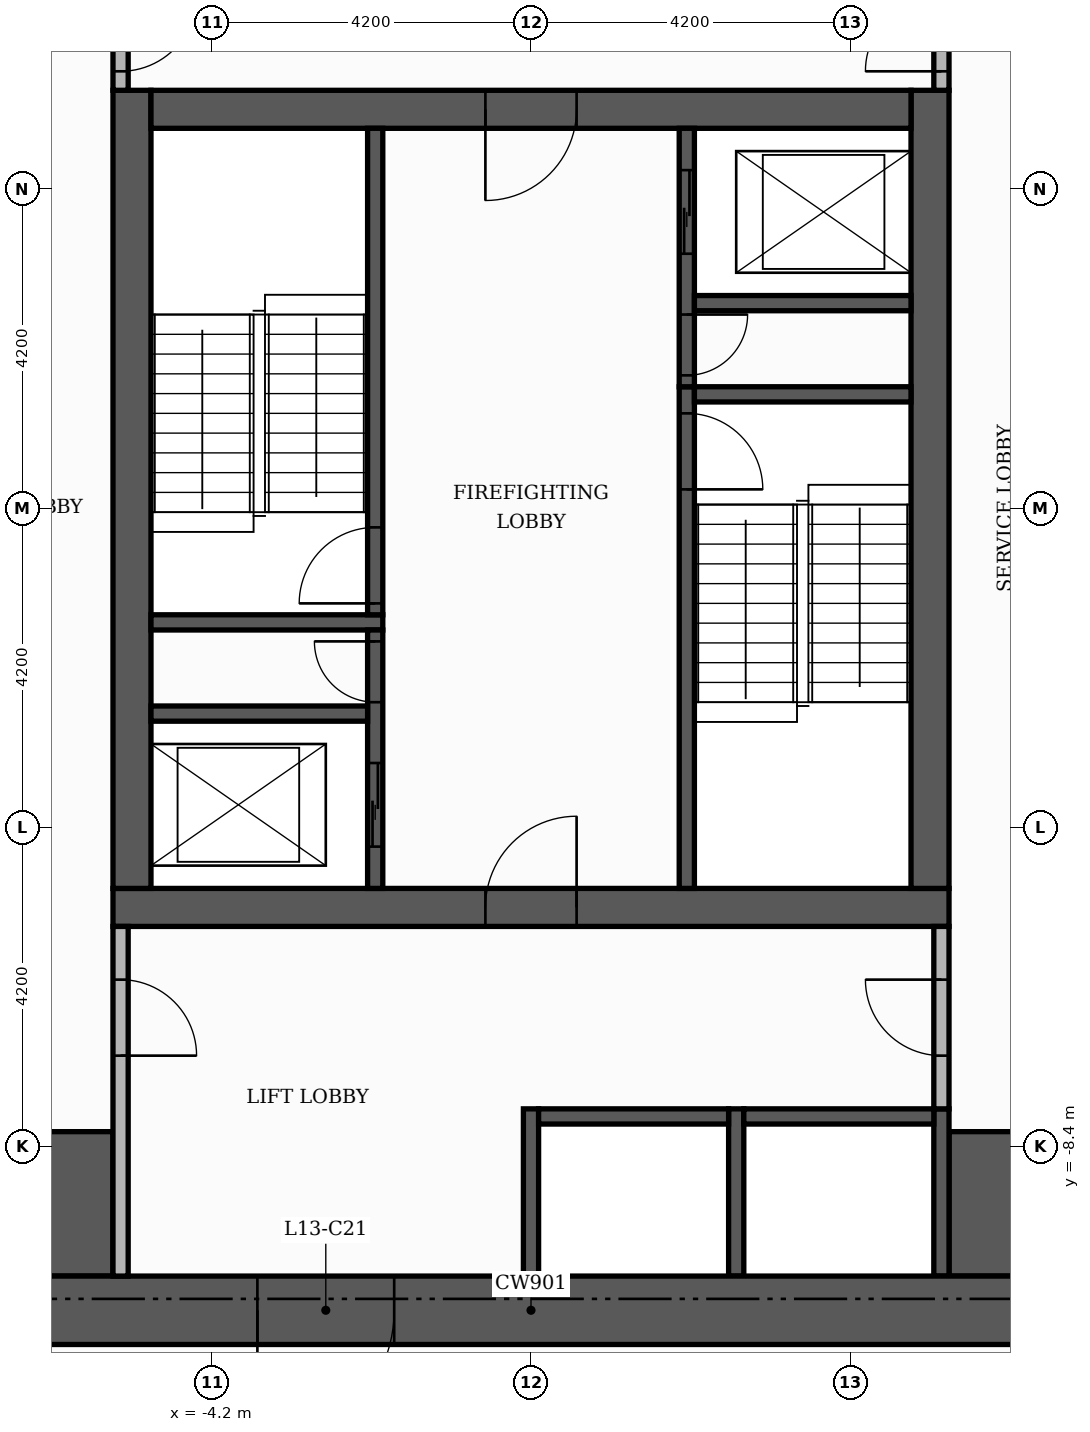
"""IFC4 building model, lengths in metres.
Left out: names, types, materials, properties, quantities, classifications, styles, units other than length and angle.
Written with IfcOpenShell. Run it as: python <this file> out.ifc"""

import sys

from ifc_helpers import new_model, si_unit, direction, frame, frame_2d, origin, place, context, subcontext, project, spatial, rectangle, extrude, element, fill, save


model = new_model("IFC4")
c1 = context("Model", 3, precision=1e-05, world=origin(), true_north=direction((0.0, 1.0)))
c2 = subcontext(c1, "Body", "Model", "MODEL_VIEW")
j1 = project(units=[si_unit("LENGTHUNIT", "METRE"), si_unit("PLANEANGLEUNIT", "RADIAN")], contexts=[c1])
p1 = place(None, origin())
s1 = spatial("IfcSite", under=j1, at=p1, CompositionType="ELEMENT")
p2 = place(p1, origin())
s2 = spatial("IfcBuilding", under=s1, at=p2, CompositionType="ELEMENT")
p3 = place(p2, frame((0.0, 0.0, 58.2)))
s3 = spatial("IfcBuildingStorey", under=s2, at=p3, CompositionType="ELEMENT", Elevation=58.2)
p4 = place(p3, frame((-5.5, -5.25, 0.0), z_axis=(0.0, 0.0, 1.0), x_axis=(1.0, 0.0, 0.0)))
e1 = element("IfcWall", 1, at=p4, inside=s3, PredefinedType="SHEAR", context=c2, shape_type="SweptSolid", body=[
    extrude(rectangle(XDim=11.0, YDim=0.5, at=frame_2d((5.5, 0.0))), origin(), (0.0, 0.0, 1.0), 3.48),
])
p5 = place(p4, frame((4.9, 0.0, 0.0)))
e2 = element("IfcOpeningElement", 2, at=p5, cuts=e1, PredefinedType="OPENING", context=c2, shape_type="SweptSolid", body=[
    extrude(rectangle(XDim=1.2, YDim=2.1, at=frame_2d((0.6, 1.05))), frame((0.0, 0.26, 0.0), z_axis=(0.0, -1.0, 0.0), x_axis=(1.0, 0.0, 0.0)), (0.0, 0.0, 1.0), 0.52),
])
for number, where, z_axis, x_axis in (
    (3, (-5.25, -5.0, 0.0), (0.0, 0.0, 1.0), (0.0, 1.0, 0.0)),
    (4, (5.25, -5.0, 0.0), (0.0, 0.0, 1.0), (0.0, 1.0, 0.0)),
):
    element("IfcWall", number, at=place(p3, frame(where, z_axis=z_axis, x_axis=x_axis)), inside=s3, PredefinedType="SHEAR", context=c2, shape_type="SweptSolid", body=[
        extrude(rectangle(XDim=10.5, YDim=0.5, at=frame_2d((5.25, 0.0))), origin(), (0.0, 0.0, 1.0), 3.48),
    ])
p6 = place(p3, frame((-5.0, 5.25, 0.0), z_axis=(0.0, 0.0, 1.0), x_axis=(1.0, 0.0, 0.0)))
e5 = element("IfcWall", 5, at=p6, inside=s3, PredefinedType="SHEAR", context=c2, shape_type="SweptSolid", body=[
    extrude(rectangle(XDim=10.0, YDim=0.5, at=frame_2d((5.0, 0.0))), origin(), (0.0, 0.0, 1.0), 3.48),
])
p7 = place(p6, frame((4.4, 0.0, 0.0)))
e6 = element("IfcOpeningElement", 6, at=p7, cuts=e5, PredefinedType="OPENING", context=c2, shape_type="SweptSolid", body=[
    extrude(rectangle(XDim=1.2, YDim=2.1, at=frame_2d((0.6, 1.05))), frame((0.0, 0.26, 0.0), z_axis=(0.0, -1.0, 0.0), x_axis=(1.0, 0.0, 0.0)), (0.0, 0.0, 1.0), 0.52),
])
for number, where, z_axis, x_axis in (
    (7, (-10.1, -9.15, 0.0), (0.0, 0.0, 1.0), (1.0, 0.0, 0.0)),
    (8, (5.5, -9.15, 0.0), (0.0, 0.0, 1.0), (1.0, 0.0, 0.0)),
):
    element("IfcWall", number, at=place(p3, frame(where, z_axis=z_axis, x_axis=x_axis)), inside=s3, PredefinedType="SHEAR", context=c2, shape_type="SweptSolid", body=[
        extrude(rectangle(XDim=4.6, YDim=1.9, at=frame_2d((2.3, 0.0))), origin(), (0.0, 0.0, 1.0), 3.48),
    ])
p8 = place(p3, frame((2.05, -5.0, 0.0), z_axis=(0.0, 0.0, 1.0), x_axis=(0.0, 1.0, 0.0)))
e9 = element("IfcWall", 9, at=p8, inside=s3, PredefinedType="SHEAR", context=c2, shape_type="SweptSolid", body=[
    extrude(rectangle(XDim=6.6, YDim=0.2, at=frame_2d((3.3, 0.0))), origin(), (0.0, 0.0, 1.0), 3.48),
])
p9 = place(p8, frame((5.25, 0.0, 0.0)))
e10 = element("IfcOpeningElement", 10, at=p9, cuts=e9, PredefinedType="OPENING", context=c2, shape_type="SweptSolid", body=[
    extrude(rectangle(XDim=1.0, YDim=2.1, at=frame_2d((0.5, 1.05))), frame((0.0, 0.11, 0.0), z_axis=(0.0, -1.0, 0.0), x_axis=(1.0, 0.0, 0.0)), (0.0, 0.0, 1.0), 0.22),
])
p10 = place(p3, frame((-5.0, -1.5, 0.0), z_axis=(0.0, 0.0, 1.0), x_axis=(1.0, 0.0, 0.0)))
e11 = element("IfcWall", 11, at=p10, inside=s3, PredefinedType="SHEAR", context=c2, shape_type="SweptSolid", body=[
    extrude(rectangle(XDim=3.05, YDim=0.2, at=frame_2d((1.525, 0.0))), origin(), (0.0, 0.0, 1.0), 3.48),
])
p11 = place(p3, frame((-2.05, -1.4, 0.0), z_axis=(0.0, 0.0, 1.0), x_axis=(0.0, 1.0, 0.0)))
e12 = element("IfcWall", 12, at=p11, inside=s3, PredefinedType="SHEAR", context=c2, shape_type="SweptSolid", body=[
    extrude(rectangle(XDim=6.4, YDim=0.2, at=frame_2d((3.2, 0.0))), origin(), (0.0, 0.0, 1.0), 3.48),
])
p12 = place(p11, frame((0.15, 0.0, 0.0)))
e13 = element("IfcOpeningElement", 13, at=p12, cuts=e12, PredefinedType="OPENING", context=c2, shape_type="SweptSolid", body=[
    extrude(rectangle(XDim=1.0, YDim=2.1, at=frame_2d((0.5, 1.05))), frame((0.0, 0.11, 0.0), z_axis=(0.0, -1.0, 0.0), x_axis=(1.0, 0.0, 0.0)), (0.0, 0.0, 1.0), 0.22),
])
p13 = place(p3, frame((2.15, 1.5, 0.0), z_axis=(0.0, 0.0, 1.0), x_axis=(1.0, 0.0, 0.0)))
e14 = element("IfcWall", 14, at=p13, inside=s3, PredefinedType="SHEAR", context=c2, shape_type="SweptSolid", body=[
    extrude(rectangle(XDim=2.85, YDim=0.2, at=frame_2d((1.425, 0.0))), origin(), (0.0, 0.0, 1.0), 3.48),
])
for number, where, z_axis, x_axis in (
    (15, (0.0, -10.1, 0.0), (0.0, 0.0, 1.0), (0.0, 1.0, 0.0)),
    (16, (2.7, -10.1, 0.0), (0.0, 0.0, 1.0), (0.0, 1.0, 0.0)),
    (17, (5.4, -10.1, 0.0), (0.0, 0.0, 1.0), (0.0, 1.0, 0.0)),
):
    element("IfcWall", number, at=place(p3, frame(where, z_axis=z_axis, x_axis=x_axis)), inside=s3, PredefinedType="SHEAR", context=c2, shape_type="SweptSolid", body=[
        extrude(rectangle(XDim=2.2, YDim=0.2, at=frame_2d((1.1, 0.0))), origin(), (0.0, 0.0, 1.0), 3.48),
    ])
for number, where, z_axis, x_axis in (
    (18, (0.1, -8.0, 0.0), (0.0, 0.0, 1.0), (1.0, 0.0, 0.0)),
    (19, (2.8, -8.0, 0.0), (0.0, 0.0, 1.0), (1.0, 0.0, 0.0)),
):
    element("IfcWall", number, at=place(p3, frame(where, z_axis=z_axis, x_axis=x_axis)), inside=s3, PredefinedType="SHEAR", context=c2, shape_type="SweptSolid", body=[
        extrude(rectangle(XDim=2.5, YDim=0.2, at=frame_2d((1.25, 0.0))), origin(), (0.0, 0.0, 1.0), 3.48),
    ])
p14 = place(p3, frame((-2.05, -5.0, 0.0), z_axis=(0.0, 0.0, 1.0), x_axis=(0.0, 1.0, 0.0)))
e20 = element("IfcWall", 20, at=p14, inside=s3, PredefinedType="SHEAR", context=c2, shape_type="SweptSolid", body=[
    extrude(rectangle(XDim=3.4, YDim=0.2, at=frame_2d((1.7, 0.0))), origin(), (0.0, 0.0, 1.0), 3.48),
])
p15 = place(p14, frame((0.55, 0.0, 0.0)))
e21 = element("IfcOpeningElement", 21, at=p15, cuts=e20, PredefinedType="OPENING", context=c2, shape_type="SweptSolid", body=[
    extrude(rectangle(XDim=1.1, YDim=2.1, at=frame_2d((0.55, 1.05))), frame((0.0, 0.11, 0.0), z_axis=(0.0, -1.0, 0.0), x_axis=(1.0, 0.0, 0.0)), (0.0, 0.0, 1.0), 0.22),
])
p16 = place(p14, frame((2.45, 0.0, 0.0)))
e22 = element("IfcOpeningElement", 22, at=p16, cuts=e20, PredefinedType="OPENING", context=c2, shape_type="SweptSolid", body=[
    extrude(rectangle(XDim=0.8, YDim=2.1, at=frame_2d((0.4, 1.05))), frame((0.0, 0.11, 0.0), z_axis=(0.0, -1.0, 0.0), x_axis=(1.0, 0.0, 0.0)), (0.0, 0.0, 1.0), 0.22),
])
p17 = place(p3, frame((-5.0, -2.7, 0.0), z_axis=(0.0, 0.0, 1.0), x_axis=(1.0, 0.0, 0.0)))
e23 = element("IfcWall", 23, at=p17, inside=s3, PredefinedType="SHEAR", context=c2, shape_type="SweptSolid", body=[
    extrude(rectangle(XDim=2.85, YDim=0.2, at=frame_2d((1.425, 0.0))), origin(), (0.0, 0.0, 1.0), 3.48),
])
p18 = place(p3, frame((2.05, 1.6, 0.0), z_axis=(0.0, 0.0, 1.0), x_axis=(0.0, 1.0, 0.0)))
e24 = element("IfcWall", 24, at=p18, inside=s3, PredefinedType="SHEAR", context=c2, shape_type="SweptSolid", body=[
    extrude(rectangle(XDim=3.4, YDim=0.2, at=frame_2d((1.7, 0.0))), origin(), (0.0, 0.0, 1.0), 3.48),
])
p19 = place(p18, frame((1.75, 0.0, 0.0)))
e25 = element("IfcOpeningElement", 25, at=p19, cuts=e24, PredefinedType="OPENING", context=c2, shape_type="SweptSolid", body=[
    extrude(rectangle(XDim=1.1, YDim=2.1, at=frame_2d((0.55, 1.05))), frame((0.0, 0.11, 0.0), z_axis=(0.0, -1.0, 0.0), x_axis=(1.0, 0.0, 0.0)), (0.0, 0.0, 1.0), 0.22),
])
p20 = place(p18, frame((0.15, 0.0, 0.0)))
e26 = element("IfcOpeningElement", 26, at=p20, cuts=e24, PredefinedType="OPENING", context=c2, shape_type="SweptSolid", body=[
    extrude(rectangle(XDim=0.8, YDim=2.1, at=frame_2d((0.4, 1.05))), frame((0.0, 0.11, 0.0), z_axis=(0.0, -1.0, 0.0), x_axis=(1.0, 0.0, 0.0)), (0.0, 0.0, 1.0), 0.22),
])
p21 = place(p3, frame((2.15, 2.7, 0.0), z_axis=(0.0, 0.0, 1.0), x_axis=(1.0, 0.0, 0.0)))
e27 = element("IfcWall", 27, at=p21, inside=s3, PredefinedType="SHEAR", context=c2, shape_type="SweptSolid", body=[
    extrude(rectangle(XDim=2.85, YDim=0.2, at=frame_2d((1.425, 0.0))), origin(), (0.0, 0.0, 1.0), 3.48),
])
p22 = place(p3, frame((-11.0, -10.55, 0.0), z_axis=(0.0, 0.0, 1.0), x_axis=(1.0, 0.0, 0.0)))
e28 = element("IfcWall", 28, at=p22, inside=s3, PredefinedType="SHEAR", context=c2, shape_type="SweptSolid", body=[
    extrude(rectangle(XDim=22.0, YDim=0.9, at=frame_2d((11.0, 0.0))), origin(), (0.0, 0.0, 1.0), 3.48),
])
p23 = place(p22, frame((7.4, 0.0, 0.0)))
e29 = element("IfcOpeningElement", 29, at=p23, cuts=e28, PredefinedType="OPENING", context=c2, shape_type="SweptSolid", body=[
    extrude(rectangle(XDim=1.8, YDim=2.2, at=frame_2d((0.9, 1.1))), frame((0.0, 0.46, 0.0), z_axis=(0.0, -1.0, 0.0), x_axis=(1.0, 0.0, 0.0)), (0.0, 0.0, 1.0), 0.92),
])
p24 = place(p3, frame((-5.4, -10.1, 0.0), z_axis=(0.0, 0.0, 1.0), x_axis=(0.0, 1.0, 0.0)))
e30 = element("IfcWall", 30, at=p24, inside=s3, PredefinedType="PARTITIONING", context=c2, shape_type="SweptSolid", body=[
    extrude(rectangle(XDim=4.6, YDim=0.2, at=frame_2d((2.3, 0.0))), origin(), (0.0, 0.0, 1.0), 3.48),
])
p25 = place(p24, frame((2.9, 0.0, 0.0)))
e31 = element("IfcOpeningElement", 31, at=p25, cuts=e30, PredefinedType="OPENING", context=c2, shape_type="SweptSolid", body=[
    extrude(rectangle(XDim=1.0, YDim=2.1, at=frame_2d((0.5, 1.05))), frame((0.0, 0.11, 0.0), z_axis=(0.0, -1.0, 0.0), x_axis=(1.0, 0.0, 0.0)), (0.0, 0.0, 1.0), 0.22),
])
p26 = place(p3, frame((5.4, -7.9, 0.0), z_axis=(0.0, 0.0, 1.0), x_axis=(0.0, 1.0, 0.0)))
e32 = element("IfcWall", 32, at=p26, inside=s3, PredefinedType="PARTITIONING", context=c2, shape_type="SweptSolid", body=[
    extrude(rectangle(XDim=2.4, YDim=0.2, at=frame_2d((1.2, 0.0))), origin(), (0.0, 0.0, 1.0), 3.48),
])
p27 = place(p26, frame((0.7, 0.0, 0.0)))
e33 = element("IfcOpeningElement", 33, at=p27, cuts=e32, PredefinedType="OPENING", context=c2, shape_type="SweptSolid", body=[
    extrude(rectangle(XDim=1.0, YDim=2.1, at=frame_2d((0.5, 1.05))), frame((0.0, 0.11, 0.0), z_axis=(0.0, -1.0, 0.0), x_axis=(1.0, 0.0, 0.0)), (0.0, 0.0, 1.0), 0.22),
])
p28 = place(p3, frame((-5.4, 5.5, 0.0), z_axis=(0.0, 0.0, 1.0), x_axis=(0.0, 1.0, 0.0)))
e34 = element("IfcWall", 34, at=p28, inside=s3, PredefinedType="PARTITIONING", context=c2, shape_type="SweptSolid", body=[
    extrude(rectangle(XDim=1.55, YDim=0.2, at=frame_2d((0.775, 0.0))), origin(), (0.0, 0.0, 1.0), 3.48),
])
p29 = place(p28, frame((0.25, 0.0, 0.0)))
e35 = element("IfcOpeningElement", 35, at=p29, cuts=e34, PredefinedType="OPENING", context=c2, shape_type="SweptSolid", body=[
    extrude(rectangle(XDim=1.0, YDim=2.1, at=frame_2d((0.5, 1.05))), frame((0.0, 0.11, 0.0), z_axis=(0.0, -1.0, 0.0), x_axis=(1.0, 0.0, 0.0)), (0.0, 0.0, 1.0), 0.22),
])
p30 = place(p3, frame((5.4, 5.5, 0.0), z_axis=(0.0, 0.0, 1.0), x_axis=(0.0, 1.0, 0.0)))
e36 = element("IfcWall", 36, at=p30, inside=s3, PredefinedType="PARTITIONING", context=c2, shape_type="SweptSolid", body=[
    extrude(rectangle(XDim=4.6, YDim=0.2, at=frame_2d((2.3, 0.0))), origin(), (0.0, 0.0, 1.0), 3.48),
])
p31 = place(p30, frame((0.25, 0.0, 0.0)))
e37 = element("IfcOpeningElement", 37, at=p31, cuts=e36, PredefinedType="OPENING", context=c2, shape_type="SweptSolid", body=[
    extrude(rectangle(XDim=1.0, YDim=2.1, at=frame_2d((0.5, 1.05))), frame((0.0, 0.11, 0.0), z_axis=(0.0, -1.0, 0.0), x_axis=(1.0, 0.0, 0.0)), (0.0, 0.0, 1.0), 0.22),
])
p32 = place(p19, origin())
e38 = element("IfcDoor", 38, at=p32, inside=s3, OperationType="SLIDING_TO_LEFT", PredefinedType="DOOR", context=c2, shape_type="SweptSolid", body=[
    extrude(rectangle(XDim=1.1, YDim=2.1, at=frame_2d((0.55, 1.05))), frame((0.0, 0.025, 0.0), z_axis=(0.0, -1.0, 0.0), x_axis=(1.0, 0.0, 0.0)), (0.0, 0.0, 1.0), 0.05),
])
fill(e25, e38)
p33 = place(p15, origin())
e39 = element("IfcDoor", 39, at=p33, inside=s3, OperationType="SLIDING_TO_LEFT", PredefinedType="DOOR", context=c2, shape_type="SweptSolid", body=[
    extrude(rectangle(XDim=1.1, YDim=2.1, at=frame_2d((0.55, 1.05))), frame((0.0, 0.025, 0.0), z_axis=(0.0, -1.0, 0.0), x_axis=(1.0, 0.0, 0.0)), (0.0, 0.0, 1.0), 0.05),
])
fill(e21, e39)
p34 = place(p12, origin())
e40 = element("IfcDoor", 40, at=p34, inside=s3, OperationType="SINGLE_SWING_LEFT", PredefinedType="DOOR", context=c2, shape_type="SweptSolid", body=[
    extrude(rectangle(XDim=1.0, YDim=2.1, at=frame_2d((0.5, 1.05))), frame((0.0, 0.025, 0.0), z_axis=(0.0, -1.0, 0.0), x_axis=(1.0, 0.0, 0.0)), (0.0, 0.0, 1.0), 0.05),
])
fill(e13, e40)
p35 = place(p9, frame((1.0, 0.0, 0.0), z_axis=(0.0, 0.0, 1.0), x_axis=(-1.0, 0.0, 0.0)))
e41 = element("IfcDoor", 41, at=p35, inside=s3, OperationType="SINGLE_SWING_LEFT", PredefinedType="DOOR", context=c2, shape_type="SweptSolid", body=[
    extrude(rectangle(XDim=1.0, YDim=2.1, at=frame_2d((0.5, 1.05))), frame((0.0, 0.025, 0.0), z_axis=(0.0, -1.0, 0.0), x_axis=(1.0, 0.0, 0.0)), (0.0, 0.0, 1.0), 0.05),
])
fill(e10, e41)
p36 = place(p20, frame((0.8, 0.0, 0.0), z_axis=(0.0, 0.0, 1.0), x_axis=(-1.0, 0.0, 0.0)))
e42 = element("IfcDoor", 42, at=p36, inside=s3, OperationType="SINGLE_SWING_RIGHT", PredefinedType="DOOR", context=c2, shape_type="SweptSolid", body=[
    extrude(rectangle(XDim=0.8, YDim=2.1, at=frame_2d((0.4, 1.05))), frame((0.0, 0.025, 0.0), z_axis=(0.0, -1.0, 0.0), x_axis=(1.0, 0.0, 0.0)), (0.0, 0.0, 1.0), 0.05),
])
fill(e26, e42)
p37 = place(p16, origin())
e43 = element("IfcDoor", 43, at=p37, inside=s3, OperationType="SINGLE_SWING_RIGHT", PredefinedType="DOOR", context=c2, shape_type="SweptSolid", body=[
    extrude(rectangle(XDim=0.8, YDim=2.1, at=frame_2d((0.4, 1.05))), frame((0.0, 0.025, 0.0), z_axis=(0.0, -1.0, 0.0), x_axis=(1.0, 0.0, 0.0)), (0.0, 0.0, 1.0), 0.05),
])
fill(e22, e43)
p38 = place(p7, frame((1.2, 0.0, 0.0), z_axis=(0.0, 0.0, 1.0), x_axis=(-1.0, 0.0, 0.0)))
e44 = element("IfcDoor", 44, at=p38, inside=s3, OperationType="SINGLE_SWING_LEFT", PredefinedType="DOOR", context=c2, shape_type="SweptSolid", body=[
    extrude(rectangle(XDim=1.2, YDim=2.1, at=frame_2d((0.6, 1.05))), frame((0.0, 0.025, 0.0), z_axis=(0.0, -1.0, 0.0), x_axis=(1.0, 0.0, 0.0)), (0.0, 0.0, 1.0), 0.05),
])
fill(e6, e44)
p39 = place(p5, origin())
e45 = element("IfcDoor", 45, at=p39, inside=s3, OperationType="SINGLE_SWING_RIGHT", PredefinedType="DOOR", context=c2, shape_type="SweptSolid", body=[
    extrude(rectangle(XDim=1.2, YDim=2.1, at=frame_2d((0.6, 1.05))), frame((0.0, 0.025, 0.0), z_axis=(0.0, -1.0, 0.0), x_axis=(1.0, 0.0, 0.0)), (0.0, 0.0, 1.0), 0.05),
])
fill(e2, e45)
p40 = place(p29, frame((1.0, 0.0, 0.0), z_axis=(0.0, 0.0, 1.0), x_axis=(-1.0, 0.0, 0.0)))
e46 = element("IfcDoor", 46, at=p40, inside=s3, OperationType="SINGLE_SWING_RIGHT", PredefinedType="DOOR", context=c2, shape_type="SweptSolid", body=[
    extrude(rectangle(XDim=1.0, YDim=2.1, at=frame_2d((0.5, 1.05))), frame((0.0, 0.025, 0.0), z_axis=(0.0, -1.0, 0.0), x_axis=(1.0, 0.0, 0.0)), (0.0, 0.0, 1.0), 0.05),
])
fill(e35, e46)
p41 = place(p31, origin())
e47 = element("IfcDoor", 47, at=p41, inside=s3, OperationType="SINGLE_SWING_LEFT", PredefinedType="DOOR", context=c2, shape_type="SweptSolid", body=[
    extrude(rectangle(XDim=1.0, YDim=2.1, at=frame_2d((0.5, 1.05))), frame((0.0, 0.025, 0.0), z_axis=(0.0, -1.0, 0.0), x_axis=(1.0, 0.0, 0.0)), (0.0, 0.0, 1.0), 0.05),
])
fill(e37, e47)
p42 = place(p25, frame((1.0, 0.0, 0.0), z_axis=(0.0, 0.0, 1.0), x_axis=(-1.0, 0.0, 0.0)))
e48 = element("IfcDoor", 48, at=p42, inside=s3, OperationType="SINGLE_SWING_LEFT", PredefinedType="DOOR", context=c2, shape_type="SweptSolid", body=[
    extrude(rectangle(XDim=1.0, YDim=2.1, at=frame_2d((0.5, 1.05))), frame((0.0, 0.025, 0.0), z_axis=(0.0, -1.0, 0.0), x_axis=(1.0, 0.0, 0.0)), (0.0, 0.0, 1.0), 0.05),
])
fill(e31, e48)
p43 = place(p27, origin())
e49 = element("IfcDoor", 49, at=p43, inside=s3, OperationType="SINGLE_SWING_RIGHT", PredefinedType="DOOR", context=c2, shape_type="SweptSolid", body=[
    extrude(rectangle(XDim=1.0, YDim=2.1, at=frame_2d((0.5, 1.05))), frame((0.0, 0.025, 0.0), z_axis=(0.0, -1.0, 0.0), x_axis=(1.0, 0.0, 0.0)), (0.0, 0.0, 1.0), 0.05),
])
fill(e33, e49)
p44 = place(p23, frame((1.8, 0.0, 0.0), z_axis=(0.0, 0.0, 1.0), x_axis=(-1.0, 0.0, 0.0)))
e50 = element("IfcDoor", 50, at=p44, inside=s3, OperationType="DOUBLE_DOOR_SINGLE_SWING", PredefinedType="DOOR", context=c2, shape_type="SweptSolid", body=[
    extrude(rectangle(XDim=1.8, YDim=2.2, at=frame_2d((0.9, 1.1))), frame((0.0, 0.025, 0.0), z_axis=(0.0, -1.0, 0.0), x_axis=(1.0, 0.0, 0.0)), (0.0, 0.0, 1.0), 0.05),
])
fill(e29, e50)
save(model, sys.argv[1])
